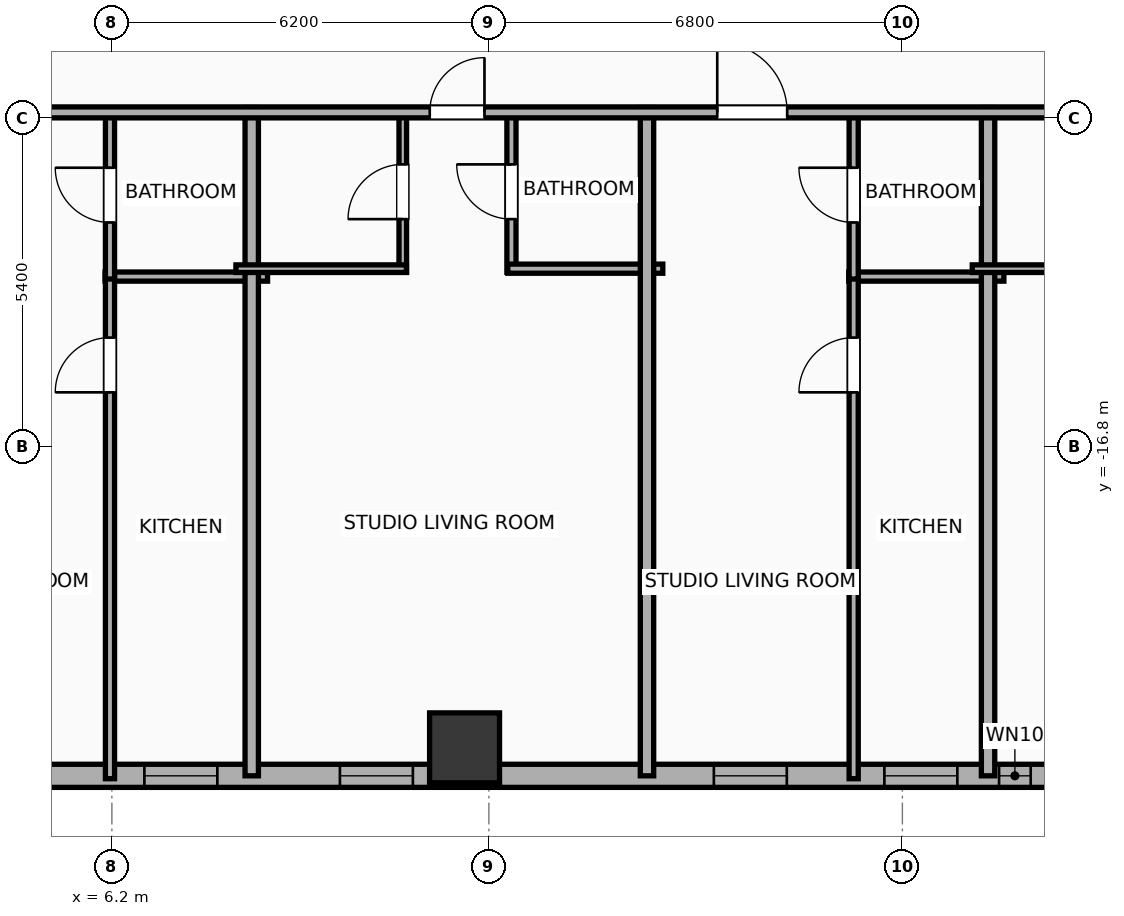
"""IFC4 building model, lengths in metres.
Left out: names, types, materials, properties, quantities, classifications, styles, units other than length and angle.
Written with IfcOpenShell. Run it as: python <this file> out.ifc"""

import sys

from ifc_helpers import new_model, si_unit, direction, frame, frame_2d, origin, origin_2d, place, context, subcontext, project, spatial, rectangle, hollow_rectangle, extrude, element, fill, save


model = new_model("IFC4")
c1 = context("Model", 3, precision=1e-05, world=origin(), true_north=direction((0.0, 1.0)))
c2 = subcontext(c1, "Body", "Model", "MODEL_VIEW")
j1 = project(units=[si_unit("LENGTHUNIT", "METRE"), si_unit("PLANEANGLEUNIT", "RADIAN")], contexts=[c1])
p1 = place(None, origin())
s1 = spatial("IfcSite", under=j1, at=p1, CompositionType="ELEMENT")
p2 = place(p1, origin())
s2 = spatial("IfcBuilding", under=s1, at=p2, CompositionType="ELEMENT")
p3 = place(p2, frame((0.0, 0.0, 49.4)))
s3 = spatial("IfcBuildingStorey", under=s2, at=p3, CompositionType="ELEMENT", Elevation=49.4)
p4 = place(p3, frame((12.0, -21.75, 0.0), z_axis=(0.0, 0.0, 1.0), x_axis=(1.0, 0.0, 0.0)))
e1 = element("IfcColumn", 1, at=p4, inside=s3, PredefinedType="COLUMN", context=c2, shape_type="SweptSolid", body=[
    extrude(hollow_rectangle(XDim=1.15, YDim=1.15, WallThickness=0.04, at=origin_2d()), origin(), (0.0, 0.0, 1.0), 3.9),
])
p5 = place(p3, frame((22.381, -22.21, 0.0), z_axis=(0.0, 0.0, 1.0), x_axis=(-1.0, 0.0, 0.0)))
e2 = element("IfcWall", 2, at=p5, inside=s3, PredefinedType="ELEMENTEDWALL", context=c2, shape_type="SweptSolid", body=[
    extrude(rectangle(XDim=51.963, YDim=0.38, at=frame_2d((25.981, 0.0))), origin(), (0.0, 0.0, 1.0), 3.65),
])
p6 = place(p5, frame((49.952, 0.0, 0.75)))
e3 = element("IfcOpeningElement", 3, at=p6, cuts=e2, PredefinedType="OPENING", context=c2, shape_type="SweptSolid", body=[
    extrude(rectangle(XDim=1.2, YDim=2.05, at=frame_2d((0.6, 1.025))), frame((0.0, 0.2, 0.0), z_axis=(0.0, -1.0, 0.0), x_axis=(1.0, 0.0, 0.0)), (0.0, 0.0, 1.0), 0.4),
])
p7 = place(p5, frame((47.486, 0.0, 0.75)))
e4 = element("IfcOpeningElement", 4, at=p7, cuts=e2, PredefinedType="OPENING", context=c2, shape_type="SweptSolid", body=[
    extrude(rectangle(XDim=1.2, YDim=2.05, at=frame_2d((0.6, 1.025))), frame((0.0, 0.2, 0.0), z_axis=(0.0, -1.0, 0.0), x_axis=(1.0, 0.0, 0.0)), (0.0, 0.0, 1.0), 0.4),
])
p8 = place(p5, frame((42.361, 0.0, 0.75)))
e5 = element("IfcOpeningElement", 5, at=p8, cuts=e2, PredefinedType="OPENING", context=c2, shape_type="SweptSolid", body=[
    extrude(rectangle(XDim=0.85, YDim=2.05, at=frame_2d((0.425, 1.025))), frame((0.0, 0.2, 0.0), z_axis=(0.0, -1.0, 0.0), x_axis=(1.0, 0.0, 0.0)), (0.0, 0.0, 1.0), 0.4),
])
p9 = place(p5, frame((44.476, 0.0, 0.75)))
e6 = element("IfcOpeningElement", 6, at=p9, cuts=e2, PredefinedType="OPENING", context=c2, shape_type="SweptSolid", body=[
    extrude(rectangle(XDim=1.2, YDim=2.05, at=frame_2d((0.6, 1.025))), frame((0.0, 0.2, 0.0), z_axis=(0.0, -1.0, 0.0), x_axis=(1.0, 0.0, 0.0)), (0.0, 0.0, 1.0), 0.4),
])
p10 = place(p5, frame((34.811, 0.0, 0.75)))
e7 = element("IfcOpeningElement", 7, at=p10, cuts=e2, PredefinedType="OPENING", context=c2, shape_type="SweptSolid", body=[
    extrude(rectangle(XDim=1.2, YDim=2.05, at=frame_2d((0.6, 1.025))), frame((0.0, 0.2, 0.0), z_axis=(0.0, -1.0, 0.0), x_axis=(1.0, 0.0, 0.0)), (0.0, 0.0, 1.0), 0.4),
])
p11 = place(p5, frame((38.061, 0.0, 0.75)))
e8 = element("IfcOpeningElement", 8, at=p11, cuts=e2, PredefinedType="OPENING", context=c2, shape_type="SweptSolid", body=[
    extrude(rectangle(XDim=1.2, YDim=2.05, at=frame_2d((0.6, 1.025))), frame((0.0, 0.2, 0.0), z_axis=(0.0, -1.0, 0.0), x_axis=(1.0, 0.0, 0.0)), (0.0, 0.0, 1.0), 0.4),
])
p12 = place(p5, frame((29.171, 0.0, 0.75)))
e9 = element("IfcOpeningElement", 9, at=p12, cuts=e2, PredefinedType="OPENING", context=c2, shape_type="SweptSolid", body=[
    extrude(rectangle(XDim=1.2, YDim=2.05, at=frame_2d((0.6, 1.025))), frame((0.0, 0.2, 0.0), z_axis=(0.0, -1.0, 0.0), x_axis=(1.0, 0.0, 0.0)), (0.0, 0.0, 1.0), 0.4),
])
p13 = place(p5, frame((21.757, 0.0, 0.75)))
e10 = element("IfcOpeningElement", 10, at=p13, cuts=e2, PredefinedType="OPENING", context=c2, shape_type="SweptSolid", body=[
    extrude(rectangle(XDim=1.2, YDim=2.05, at=frame_2d((0.6, 1.025))), frame((0.0, 0.2, 0.0), z_axis=(0.0, -1.0, 0.0), x_axis=(1.0, 0.0, 0.0)), (0.0, 0.0, 1.0), 0.4),
])
p14 = place(p5, frame((25.007, 0.0, 0.75)))
e11 = element("IfcOpeningElement", 11, at=p14, cuts=e2, PredefinedType="OPENING", context=c2, shape_type="SweptSolid", body=[
    extrude(rectangle(XDim=1.2, YDim=2.05, at=frame_2d((0.6, 1.025))), frame((0.0, 0.2, 0.0), z_axis=(0.0, -1.0, 0.0), x_axis=(1.0, 0.0, 0.0)), (0.0, 0.0, 1.0), 0.4),
])
p15 = place(p5, frame((17.697, 0.0, 0.75)))
e12 = element("IfcOpeningElement", 12, at=p15, cuts=e2, PredefinedType="OPENING", context=c2, shape_type="SweptSolid", body=[
    extrude(rectangle(XDim=1.2, YDim=2.05, at=frame_2d((0.6, 1.025))), frame((0.0, 0.2, 0.0), z_axis=(0.0, -1.0, 0.0), x_axis=(1.0, 0.0, 0.0)), (0.0, 0.0, 1.0), 0.4),
])
p16 = place(p5, frame((14.447, 0.0, 0.75)))
e13 = element("IfcOpeningElement", 13, at=p16, cuts=e2, PredefinedType="OPENING", context=c2, shape_type="SweptSolid", body=[
    extrude(rectangle(XDim=1.2, YDim=2.05, at=frame_2d((0.6, 1.025))), frame((0.0, 0.2, 0.0), z_axis=(0.0, -1.0, 0.0), x_axis=(1.0, 0.0, 0.0)), (0.0, 0.0, 1.0), 0.4),
])
p17 = place(p5, frame((11.231, 0.0, 0.75)))
e14 = element("IfcOpeningElement", 14, at=p17, cuts=e2, PredefinedType="OPENING", context=c2, shape_type="SweptSolid", body=[
    extrude(rectangle(XDim=1.2, YDim=2.05, at=frame_2d((0.6, 1.025))), frame((0.0, 0.2, 0.0), z_axis=(0.0, -1.0, 0.0), x_axis=(1.0, 0.0, 0.0)), (0.0, 0.0, 1.0), 0.4),
])
p18 = place(p5, frame((5.082, 0.0, 0.75)))
e15 = element("IfcOpeningElement", 15, at=p18, cuts=e2, PredefinedType="OPENING", context=c2, shape_type="SweptSolid", body=[
    extrude(rectangle(XDim=1.2, YDim=2.05, at=frame_2d((0.6, 1.025))), frame((0.0, 0.2, 0.0), z_axis=(0.0, -1.0, 0.0), x_axis=(1.0, 0.0, 0.0)), (0.0, 0.0, 1.0), 0.4),
])
p19 = place(p5, frame((2.277, 0.0, 0.75)))
e16 = element("IfcOpeningElement", 16, at=p19, cuts=e2, PredefinedType="OPENING", context=c2, shape_type="SweptSolid", body=[
    extrude(rectangle(XDim=1.2, YDim=2.05, at=frame_2d((0.6, 1.025))), frame((0.0, 0.2, 0.0), z_axis=(0.0, -1.0, 0.0), x_axis=(1.0, 0.0, 0.0)), (0.0, 0.0, 1.0), 0.4),
])
p20 = place(p5, frame((1.071, 0.0, 0.75)))
e17 = element("IfcOpeningElement", 17, at=p20, cuts=e2, PredefinedType="OPENING", context=c2, shape_type="SweptSolid", body=[
    extrude(rectangle(XDim=0.52, YDim=2.05, at=frame_2d((0.26, 1.025))), frame((0.0, 0.2, 0.0), z_axis=(0.0, -1.0, 0.0), x_axis=(1.0, 0.0, 0.0)), (0.0, 0.0, 1.0), 0.4),
])
p21 = place(p3, frame((6.089, -14.0, 0.0), z_axis=(0.0, 0.0, 1.0), x_axis=(1.0, 0.0, 0.0)))
e18 = element("IfcWall", 18, at=p21, inside=s3, PredefinedType="PLUMBINGWALL", context=c2, shape_type="SweptSolid", body=[
    extrude(rectangle(XDim=2.671, YDim=0.15, at=frame_2d((1.335, 0.0))), origin(), (0.0, 0.0, 1.0), 3.65),
])
p22 = place(p3, frame((6.169, -22.258, 0.0), z_axis=(0.0, 0.0, 1.0), x_axis=(0.0, 1.0, 0.0)))
e19 = element("IfcWall", 19, at=p22, inside=s3, PredefinedType="PLUMBINGWALL", context=c2, shape_type="SweptSolid", body=[
    extrude(rectangle(XDim=8.298, YDim=0.15, at=frame_2d((4.149, 0.0))), origin(), (0.0, 0.0, 1.0), 3.65),
])
p23 = place(p22, frame((6.354, 0.0, 0.0)))
e20 = element("IfcOpeningElement", 20, at=p23, cuts=e19, PredefinedType="OPENING", context=c2, shape_type="SweptSolid", body=[
    extrude(rectangle(XDim=0.9, YDim=2.05, at=frame_2d((0.45, 1.025))), frame((0.0, 0.085, 0.0), z_axis=(0.0, -1.0, 0.0), x_axis=(1.0, 0.0, 0.0)), (0.0, 0.0, 1.0), 0.17),
])
p24 = place(p3, frame((6.169, -14.04, 0.0), z_axis=(0.0, 0.0, 1.0), x_axis=(0.0, 1.0, 0.0)))
e21 = element("IfcWall", 21, at=p24, inside=s3, PredefinedType="PLUMBINGWALL", context=c2, shape_type="SweptSolid", body=[
    extrude(rectangle(XDim=2.76, YDim=0.15, at=frame_2d((1.38, 0.0))), origin(), (0.0, 0.0, 1.0), 3.65),
])
p25 = place(p24, frame((0.93, 0.0, 0.0)))
e22 = element("IfcOpeningElement", 22, at=p25, cuts=e21, PredefinedType="OPENING", context=c2, shape_type="SweptSolid", body=[
    extrude(rectangle(XDim=0.9, YDim=2.05, at=frame_2d((0.45, 1.025))), frame((0.0, 0.085, 0.0), z_axis=(0.0, -1.0, 0.0), x_axis=(1.0, 0.0, 0.0)), (0.0, 0.0, 1.0), 0.17),
])
p26 = place(p3, frame((8.5, -22.21, 0.0), z_axis=(0.0, 0.0, 1.0), x_axis=(0.0, 1.0, 0.0)))
e23 = element("IfcWall", 23, at=p26, inside=s3, PredefinedType="PARTITIONING", context=c2, shape_type="SweptSolid", body=[
    extrude(rectangle(XDim=10.99, YDim=0.22, at=frame_2d((5.495, 0.0))), origin(), (0.0, 0.0, 1.0), 3.65),
])
p27 = place(p3, frame((10.984, -13.93, 0.0), z_axis=(0.0, 0.0, 1.0), x_axis=(0.0, 1.0, 0.0)))
e24 = element("IfcWall", 24, at=p27, inside=s3, PredefinedType="PARTITIONING", context=c2, shape_type="SweptSolid", body=[
    extrude(rectangle(XDim=2.65, YDim=0.125, at=frame_2d((1.325, 0.0))), origin(), (0.0, 0.0, 1.0), 3.65),
])
p28 = place(p27, frame((0.875, 0.0, 0.0)))
e25 = element("IfcOpeningElement", 25, at=p28, cuts=e24, PredefinedType="OPENING", context=c2, shape_type="SweptSolid", body=[
    extrude(rectangle(XDim=0.9, YDim=2.05, at=frame_2d((0.45, 1.025))), frame((0.0, 0.073, 0.0), z_axis=(0.0, -1.0, 0.0), x_axis=(1.0, 0.0, 0.0)), (0.0, 0.0, 1.0), 0.145),
])
p29 = place(p3, frame((12.771, -13.93, 0.0), z_axis=(0.0, 0.0, 1.0), x_axis=(0.0, 1.0, 0.0)))
e26 = element("IfcWall", 26, at=p29, inside=s3, PredefinedType="PLUMBINGWALL", context=c2, shape_type="SweptSolid", body=[
    extrude(rectangle(XDim=2.65, YDim=0.15, at=frame_2d((1.325, 0.0))), origin(), (0.0, 0.0, 1.0), 3.65),
])
p30 = place(p29, frame((0.875, 0.0, 0.0)))
e27 = element("IfcOpeningElement", 27, at=p30, cuts=e26, PredefinedType="OPENING", context=c2, shape_type="SweptSolid", body=[
    extrude(rectangle(XDim=0.9, YDim=2.05, at=frame_2d((0.45, 1.025))), frame((0.0, 0.085, 0.0), z_axis=(0.0, -1.0, 0.0), x_axis=(1.0, 0.0, 0.0)), (0.0, 0.0, 1.0), 0.17),
])
p31 = place(p3, frame((8.24, -13.87, 0.0), z_axis=(0.0, 0.0, 1.0), x_axis=(1.0, 0.0, 0.0)))
e28 = element("IfcWall", 28, at=p31, inside=s3, PredefinedType="PARTITIONING", context=c2, shape_type="SweptSolid", body=[
    extrude(rectangle(XDim=2.804, YDim=0.125, at=frame_2d((1.402, 0.0))), origin(), (0.0, 0.0, 1.0), 3.65),
])
p32 = place(p3, frame((12.711, -13.87, 0.0), z_axis=(0.0, 0.0, 1.0), x_axis=(1.0, 0.0, 0.0)))
e29 = element("IfcWall", 29, at=p32, inside=s3, PredefinedType="PLUMBINGWALL", context=c2, shape_type="SweptSolid", body=[
    extrude(rectangle(XDim=2.549, YDim=0.15, at=frame_2d((1.274, 0.0))), origin(), (0.0, 0.0, 1.0), 3.65),
])
p33 = place(p3, frame((15.0, -22.21, 0.0), z_axis=(0.0, 0.0, 1.0), x_axis=(0.0, 1.0, 0.0)))
e30 = element("IfcWall", 30, at=p33, inside=s3, PredefinedType="PARTITIONING", context=c2, shape_type="SweptSolid", body=[
    extrude(rectangle(XDim=10.99, YDim=0.22, at=frame_2d((5.495, 0.0))), origin(), (0.0, 0.0, 1.0), 3.65),
])
p34 = place(p3, frame((18.319, -14.0, 0.0), z_axis=(0.0, 0.0, 1.0), x_axis=(1.0, 0.0, 0.0)))
e31 = element("IfcWall", 31, at=p34, inside=s3, PredefinedType="PLUMBINGWALL", context=c2, shape_type="SweptSolid", body=[
    extrude(rectangle(XDim=2.55, YDim=0.15, at=frame_2d((1.275, 0.0))), origin(), (0.0, 0.0, 1.0), 3.65),
])
p35 = place(p3, frame((18.399, -22.258, 0.0), z_axis=(0.0, 0.0, 1.0), x_axis=(0.0, 1.0, 0.0)))
e32 = element("IfcWall", 32, at=p35, inside=s3, PredefinedType="PLUMBINGWALL", context=c2, shape_type="SweptSolid", body=[
    extrude(rectangle(XDim=8.298, YDim=0.15, at=frame_2d((4.149, 0.0))), origin(), (0.0, 0.0, 1.0), 3.65),
])
p36 = place(p35, frame((6.354, 0.0, 0.0)))
e33 = element("IfcOpeningElement", 33, at=p36, cuts=e32, PredefinedType="OPENING", context=c2, shape_type="SweptSolid", body=[
    extrude(rectangle(XDim=0.9, YDim=2.05, at=frame_2d((0.45, 1.025))), frame((0.0, 0.085, 0.0), z_axis=(0.0, -1.0, 0.0), x_axis=(1.0, 0.0, 0.0)), (0.0, 0.0, 1.0), 0.17),
])
p37 = place(p3, frame((18.399, -14.04, 0.0), z_axis=(0.0, 0.0, 1.0), x_axis=(0.0, 1.0, 0.0)))
e34 = element("IfcWall", 34, at=p37, inside=s3, PredefinedType="PLUMBINGWALL", context=c2, shape_type="SweptSolid", body=[
    extrude(rectangle(XDim=2.76, YDim=0.15, at=frame_2d((1.38, 0.0))), origin(), (0.0, 0.0, 1.0), 3.65),
])
p38 = place(p37, frame((0.93, 0.0, 0.0)))
e35 = element("IfcOpeningElement", 35, at=p38, cuts=e34, PredefinedType="OPENING", context=c2, shape_type="SweptSolid", body=[
    extrude(rectangle(XDim=0.9, YDim=2.05, at=frame_2d((0.45, 1.025))), frame((0.0, 0.085, 0.0), z_axis=(0.0, -1.0, 0.0), x_axis=(1.0, 0.0, 0.0)), (0.0, 0.0, 1.0), 0.17),
])
p39 = place(p3, frame((20.609, -22.21, 0.0), z_axis=(0.0, 0.0, 1.0), x_axis=(0.0, 1.0, 0.0)))
e36 = element("IfcWall", 36, at=p39, inside=s3, PredefinedType="PARTITIONING", context=c2, shape_type="SweptSolid", body=[
    extrude(rectangle(XDim=10.99, YDim=0.22, at=frame_2d((5.495, 0.0))), origin(), (0.0, 0.0, 1.0), 2.94),
])
p40 = place(p3, frame((20.349, -13.87, 0.0), z_axis=(0.0, 0.0, 1.0), x_axis=(1.0, 0.0, 0.0)))
e37 = element("IfcWall", 37, at=p40, inside=s3, PredefinedType="PARTITIONING", context=c2, shape_type="SweptSolid", body=[
    extrude(rectangle(XDim=2.63, YDim=0.125, at=frame_2d((1.315, 0.0))), origin(), (0.0, 0.0, 1.0), 3.65),
])
p41 = place(p3, frame((-33.41, -11.3, 0.0), z_axis=(0.0, 0.0, 1.0), x_axis=(1.0, 0.0, 0.0)))
e38 = element("IfcWall", 38, at=p41, inside=s3, PredefinedType="PARTITIONING", context=c2, shape_type="SweptSolid", body=[
    extrude(rectangle(XDim=59.62, YDim=0.18, at=frame_2d((29.81, 0.0))), origin(), (0.0, 0.0, 1.0), 3.65),
])
p42 = place(p41, frame((4.344, 0.0, 0.0)))
e39 = element("IfcOpeningElement", 39, at=p42, cuts=e38, PredefinedType="OPENING", context=c2, shape_type="SweptSolid", body=[
    extrude(rectangle(XDim=1.15, YDim=2.05, at=frame_2d((0.575, 1.025))), frame((0.0, 0.1, 0.0), z_axis=(0.0, -1.0, 0.0), x_axis=(1.0, 0.0, 0.0)), (0.0, 0.0, 1.0), 0.2),
])
p43 = place(p41, frame((13.358, 0.0, 0.0)))
e40 = element("IfcOpeningElement", 40, at=p43, cuts=e38, PredefinedType="OPENING", context=c2, shape_type="SweptSolid", body=[
    extrude(rectangle(XDim=1.15, YDim=2.05, at=frame_2d((0.575, 1.025))), frame((0.0, 0.1, 0.0), z_axis=(0.0, -1.0, 0.0), x_axis=(1.0, 0.0, 0.0)), (0.0, 0.0, 1.0), 0.2),
])
p44 = place(p41, frame((19.773, 0.0, 0.0)))
e41 = element("IfcOpeningElement", 41, at=p44, cuts=e38, PredefinedType="OPENING", context=c2, shape_type="SweptSolid", body=[
    extrude(rectangle(XDim=1.15, YDim=2.05, at=frame_2d((0.575, 1.025))), frame((0.0, 0.1, 0.0), z_axis=(0.0, -1.0, 0.0), x_axis=(1.0, 0.0, 0.0)), (0.0, 0.0, 1.0), 0.2),
])
p45 = place(p41, frame((25.336, 0.0, 0.0)))
e42 = element("IfcOpeningElement", 42, at=p45, cuts=e38, PredefinedType="OPENING", context=c2, shape_type="SweptSolid", body=[
    extrude(rectangle(XDim=0.9, YDim=2.05, at=frame_2d((0.45, 1.025))), frame((0.0, 0.1, 0.0), z_axis=(0.0, -1.0, 0.0), x_axis=(1.0, 0.0, 0.0)), (0.0, 0.0, 1.0), 0.2),
])
p46 = place(p41, frame((32.83, 0.0, 0.0)))
e43 = element("IfcOpeningElement", 43, at=p46, cuts=e38, PredefinedType="OPENING", context=c2, shape_type="SweptSolid", body=[
    extrude(rectangle(XDim=1.15, YDim=2.05, at=frame_2d((0.575, 1.025))), frame((0.0, 0.1, 0.0), z_axis=(0.0, -1.0, 0.0), x_axis=(1.0, 0.0, 0.0)), (0.0, 0.0, 1.0), 0.2),
])
p47 = place(p41, frame((36.95, 0.0, 0.0)))
e44 = element("IfcOpeningElement", 44, at=p47, cuts=e38, PredefinedType="OPENING", context=c2, shape_type="SweptSolid", body=[
    extrude(rectangle(XDim=1.15, YDim=2.05, at=frame_2d((0.575, 1.025))), frame((0.0, 0.1, 0.0), z_axis=(0.0, -1.0, 0.0), x_axis=(1.0, 0.0, 0.0)), (0.0, 0.0, 1.0), 0.2),
])
p48 = place(p41, frame((44.837, 0.0, 0.0)))
e45 = element("IfcOpeningElement", 45, at=p48, cuts=e38, PredefinedType="OPENING", context=c2, shape_type="SweptSolid", body=[
    extrude(rectangle(XDim=0.9, YDim=2.05, at=frame_2d((0.45, 1.025))), frame((0.0, 0.1, 0.0), z_axis=(0.0, -1.0, 0.0), x_axis=(1.0, 0.0, 0.0)), (0.0, 0.0, 1.0), 0.2),
])
p49 = place(p41, frame((49.565, 0.0, 0.0)))
e46 = element("IfcOpeningElement", 46, at=p49, cuts=e38, PredefinedType="OPENING", context=c2, shape_type="SweptSolid", body=[
    extrude(rectangle(XDim=1.15, YDim=2.05, at=frame_2d((0.575, 1.025))), frame((0.0, 0.1, 0.0), z_axis=(0.0, -1.0, 0.0), x_axis=(1.0, 0.0, 0.0)), (0.0, 0.0, 1.0), 0.2),
])
p50 = place(p41, frame((56.583, 0.0, 0.0)))
e47 = element("IfcOpeningElement", 47, at=p50, cuts=e38, PredefinedType="OPENING", context=c2, shape_type="SweptSolid", body=[
    extrude(rectangle(XDim=0.9, YDim=2.05, at=frame_2d((0.45, 1.025))), frame((0.0, 0.1, 0.0), z_axis=(0.0, -1.0, 0.0), x_axis=(1.0, 0.0, 0.0)), (0.0, 0.0, 1.0), 0.2),
])
p51 = place(p16, origin())
e48 = element("IfcWindow", 48, at=p51, inside=s3, PartitioningType="SINGLE_PANEL", PredefinedType="WINDOW", context=c2, shape_type="SweptSolid", body=[
    extrude(rectangle(XDim=1.2, YDim=2.05, at=frame_2d((0.6, 1.025))), frame((0.0, 0.03, 0.0), z_axis=(0.0, -1.0, 0.0), x_axis=(1.0, 0.0, 0.0)), (0.0, 0.0, 1.0), 0.06),
])
fill(e13, e48)
p52 = place(p17, origin())
e49 = element("IfcWindow", 49, at=p52, inside=s3, PartitioningType="SINGLE_PANEL", PredefinedType="WINDOW", context=c2, shape_type="SweptSolid", body=[
    extrude(rectangle(XDim=1.2, YDim=2.05, at=frame_2d((0.6, 1.025))), frame((0.0, 0.03, 0.0), z_axis=(0.0, -1.0, 0.0), x_axis=(1.0, 0.0, 0.0)), (0.0, 0.0, 1.0), 0.06),
])
fill(e14, e49)
p53 = place(p18, origin())
e50 = element("IfcWindow", 50, at=p53, inside=s3, PartitioningType="SINGLE_PANEL", PredefinedType="WINDOW", context=c2, shape_type="SweptSolid", body=[
    extrude(rectangle(XDim=1.2, YDim=2.05, at=frame_2d((0.6, 1.025))), frame((0.0, 0.03, 0.0), z_axis=(0.0, -1.0, 0.0), x_axis=(1.0, 0.0, 0.0)), (0.0, 0.0, 1.0), 0.06),
])
fill(e15, e50)
p54 = place(p19, origin())
e51 = element("IfcWindow", 51, at=p54, inside=s3, PartitioningType="SINGLE_PANEL", PredefinedType="WINDOW", context=c2, shape_type="SweptSolid", body=[
    extrude(rectangle(XDim=1.2, YDim=2.05, at=frame_2d((0.6, 1.025))), frame((0.0, 0.03, 0.0), z_axis=(0.0, -1.0, 0.0), x_axis=(1.0, 0.0, 0.0)), (0.0, 0.0, 1.0), 0.06),
])
fill(e16, e51)
p55 = place(p20, origin())
e52 = element("IfcWindow", 52, at=p55, inside=s3, PartitioningType="SINGLE_PANEL", PredefinedType="WINDOW", context=c2, shape_type="SweptSolid", body=[
    extrude(rectangle(XDim=0.52, YDim=2.05, at=frame_2d((0.26, 1.025))), frame((0.0, 0.03, 0.0), z_axis=(0.0, -1.0, 0.0), x_axis=(1.0, 0.0, 0.0)), (0.0, 0.0, 1.0), 0.06),
])
fill(e17, e52)
p56 = place(p23, origin())
e53 = element("IfcDoor", 53, at=p56, inside=s3, OperationType="SINGLE_SWING_LEFT", PredefinedType="DOOR", context=c2, shape_type="SweptSolid", body=[
    extrude(rectangle(XDim=0.9, YDim=2.05, at=frame_2d((0.45, 1.025))), frame((0.0, 0.025, 0.0), z_axis=(0.0, -1.0, 0.0), x_axis=(1.0, 0.0, 0.0)), (0.0, 0.0, 1.0), 0.05),
])
fill(e20, e53)
p57 = place(p25, origin())
e54 = element("IfcDoor", 54, at=p57, inside=s3, OperationType="SINGLE_SWING_RIGHT", PredefinedType="DOOR", context=c2, shape_type="SweptSolid", body=[
    extrude(rectangle(XDim=0.9, YDim=2.05, at=frame_2d((0.45, 1.025))), frame((0.0, 0.025, 0.0), z_axis=(0.0, -1.0, 0.0), x_axis=(1.0, 0.0, 0.0)), (0.0, 0.0, 1.0), 0.05),
])
fill(e22, e54)
p58 = place(p28, origin())
e55 = element("IfcDoor", 55, at=p58, inside=s3, OperationType="SINGLE_SWING_LEFT", PredefinedType="DOOR", context=c2, shape_type="SweptSolid", body=[
    extrude(rectangle(XDim=0.9, YDim=2.05, at=frame_2d((0.45, 1.025))), frame((0.0, 0.025, 0.0), z_axis=(0.0, -1.0, 0.0), x_axis=(1.0, 0.0, 0.0)), (0.0, 0.0, 1.0), 0.05),
])
fill(e25, e55)
p59 = place(p30, origin())
e56 = element("IfcDoor", 56, at=p59, inside=s3, OperationType="SINGLE_SWING_RIGHT", PredefinedType="DOOR", context=c2, shape_type="SweptSolid", body=[
    extrude(rectangle(XDim=0.9, YDim=2.05, at=frame_2d((0.45, 1.025))), frame((0.0, 0.025, 0.0), z_axis=(0.0, -1.0, 0.0), x_axis=(1.0, 0.0, 0.0)), (0.0, 0.0, 1.0), 0.05),
])
fill(e27, e56)
p60 = place(p36, origin())
e57 = element("IfcDoor", 57, at=p60, inside=s3, OperationType="SINGLE_SWING_LEFT", PredefinedType="DOOR", context=c2, shape_type="SweptSolid", body=[
    extrude(rectangle(XDim=0.9, YDim=2.05, at=frame_2d((0.45, 1.025))), frame((0.0, 0.025, 0.0), z_axis=(0.0, -1.0, 0.0), x_axis=(1.0, 0.0, 0.0)), (0.0, 0.0, 1.0), 0.05),
])
fill(e33, e57)
p61 = place(p38, origin())
e58 = element("IfcDoor", 58, at=p61, inside=s3, OperationType="SINGLE_SWING_RIGHT", PredefinedType="DOOR", context=c2, shape_type="SweptSolid", body=[
    extrude(rectangle(XDim=0.9, YDim=2.05, at=frame_2d((0.45, 1.025))), frame((0.0, 0.025, 0.0), z_axis=(0.0, -1.0, 0.0), x_axis=(1.0, 0.0, 0.0)), (0.0, 0.0, 1.0), 0.05),
])
fill(e35, e58)
p62 = place(p48, origin())
e59 = element("IfcDoor", 59, at=p62, inside=s3, OperationType="SINGLE_SWING_RIGHT", PredefinedType="DOOR", context=c2, shape_type="SweptSolid", body=[
    extrude(rectangle(XDim=0.9, YDim=2.05, at=frame_2d((0.45, 1.025))), frame((0.0, 0.025, 0.0), z_axis=(0.0, -1.0, 0.0), x_axis=(1.0, 0.0, 0.0)), (0.0, 0.0, 1.0), 0.05),
])
fill(e45, e59)
p63 = place(p49, origin())
e60 = element("IfcDoor", 60, at=p63, inside=s3, OperationType="SINGLE_SWING_LEFT", PredefinedType="DOOR", context=c2, shape_type="SweptSolid", body=[
    extrude(rectangle(XDim=1.15, YDim=2.05, at=frame_2d((0.575, 1.025))), frame((0.0, 0.025, 0.0), z_axis=(0.0, -1.0, 0.0), x_axis=(1.0, 0.0, 0.0)), (0.0, 0.0, 1.0), 0.05),
])
fill(e46, e60)
save(model, sys.argv[1])
